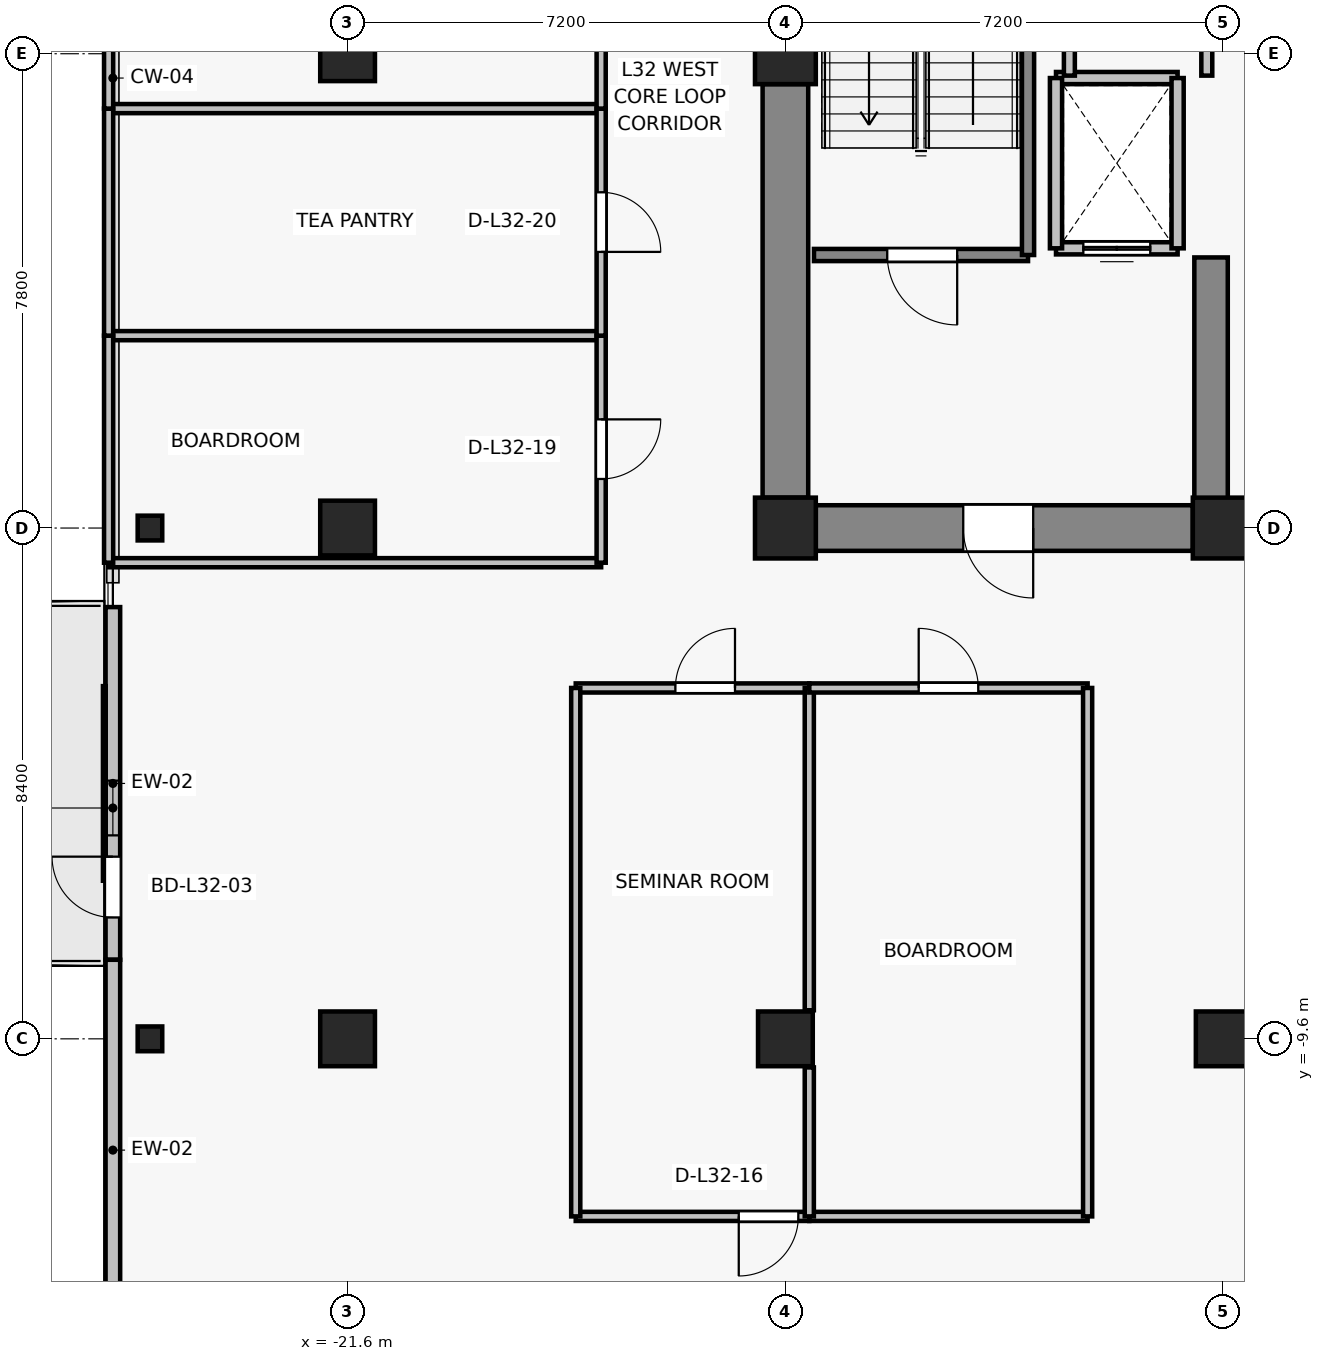
"""IFC4 building model, lengths in metres.
Left out: names, types, materials, properties, quantities, classifications, styles, units other than length and angle.
Written with IfcOpenShell. Run it as: python <this file> out.ifc"""

import sys

from ifc_helpers import new_model, si_unit, direction, frame, frame_2d, origin, origin_2d, place, context, subcontext, project, spatial, rectangle, i_section, extrude, source, transform, mapped, element, fill, save


model = new_model("IFC4")
c1 = context("Model", 3, precision=1e-05, world=origin(), true_north=direction((0.0, 1.0)))
c2 = subcontext(c1, "Body", "Model", "MODEL_VIEW")
j1 = project(units=[si_unit("LENGTHUNIT", "METRE"), si_unit("PLANEANGLEUNIT", "RADIAN")], contexts=[c1])
p1 = place(None, origin())
s1 = spatial("IfcSite", under=j1, at=p1, CompositionType="ELEMENT")
p2 = place(p1, origin())
s2 = spatial("IfcBuilding", under=s1, at=p2, CompositionType="ELEMENT")
p3 = place(p2, frame((0.0, 0.0, 116.5)))
s3 = spatial("IfcBuildingStorey", under=s2, at=p3, CompositionType="ELEMENT", Elevation=116.5)
for number, where, z_axis, x_axis in (
    (1, (-14.4, -1.2, 0.0), (0.0, 0.0, 1.0), (1.0, 0.0, 0.0)),
    (2, (-7.2, -1.2, 0.0), (0.0, 0.0, 1.0), (1.0, 0.0, 0.0)),
    (3, (-14.4, 6.6, 0.0), (0.0, 0.0, 1.0), (1.0, 0.0, 0.0)),
):
    element("IfcColumn", number, at=place(p3, frame(where, z_axis=z_axis, x_axis=x_axis)), inside=s3, PredefinedType="COLUMN", context=c2, shape_type="SweptSolid", body=[
        extrude(rectangle(XDim=1.0, YDim=1.0, at=origin_2d()), origin(), (0.0, 0.0, 1.0), 3.3),
    ])
for number, where, z_axis, x_axis in (
    (4, (-14.4, -9.6, 0.0), (0.0, 0.0, 1.0), (1.0, 0.0, 0.0)),
    (5, (-7.2, -9.6, 0.0), (0.0, 0.0, 1.0), (1.0, 0.0, 0.0)),
    (6, (-21.6, -9.6, 0.0), (0.0, 0.0, 1.0), (1.0, 0.0, 0.0)),
    (7, (-21.6, -1.2, 0.0), (0.0, 0.0, 1.0), (1.0, 0.0, 0.0)),
    (8, (-21.6, 6.6, 0.0), (0.0, 0.0, 1.0), (1.0, 0.0, 0.0)),
):
    element("IfcColumn", number, at=place(p3, frame(where, z_axis=z_axis, x_axis=x_axis)), inside=s3, PredefinedType="COLUMN", context=c2, shape_type="SweptSolid", body=[
        extrude(rectangle(XDim=0.9, YDim=0.9, at=origin_2d()), origin(), (0.0, 0.0, 1.0), 3.3),
    ])
for number, where, z_axis, x_axis in (
    (9, (-24.85, -9.6, 0.0), (0.0, 0.0, 1.0), (1.0, 0.0, 0.0)),
    (10, (-24.85, -1.2, 0.0), (0.0, 0.0, 1.0), (1.0, 0.0, 0.0)),
):
    element("IfcColumn", number, at=place(p3, frame(where, z_axis=z_axis, x_axis=x_axis)), inside=s3, PredefinedType="COLUMN", context=c2, shape_type="SweptSolid", body=[
        extrude(i_section(OverallWidth=0.404, OverallDepth=0.407, WebThickness=0.022, FlangeThickness=0.032, FilletRadius=0.015, at=origin_2d()), origin(), (0.0, 0.0, 1.0), 3.3),
    ])
p4 = place(p3, frame((-14.4, -0.7, 0.0), z_axis=(0.0, 0.0, 1.0), x_axis=(0.0, 1.0, 0.0)))
e11 = element("IfcWall", 11, at=p4, inside=s3, PredefinedType="SHEAR", context=c2, shape_type="SweptSolid", body=[
    extrude(rectangle(XDim=6.8, YDim=0.75, at=frame_2d((3.4, 0.0))), origin(), (0.0, 0.0, 1.0), 3.075),
])
p5 = place(p3, frame((-7.7, -1.2, 0.0), z_axis=(0.0, 0.0, 1.0), x_axis=(-1.0, 0.0, 0.0)))
e12 = element("IfcWall", 12, at=p5, inside=s3, PredefinedType="SHEAR", context=c2, shape_type="SweptSolid", body=[
    extrude(rectangle(XDim=6.2, YDim=0.75, at=frame_2d((3.1, 0.0))), origin(), (0.0, 0.0, 1.0), 3.075),
])
p6 = place(p5, frame((2.625, 0.0, 0.0)))
e13 = element("IfcOpeningElement", 13, at=p6, cuts=e12, PredefinedType="OPENING", context=c2, shape_type="SweptSolid", body=[
    extrude(rectangle(XDim=1.15, YDim=2.15, at=frame_2d((0.575, 1.075))), frame((0.0, 0.385, 0.0), z_axis=(0.0, -1.0, 0.0), x_axis=(1.0, 0.0, 0.0)), (0.0, 0.0, 1.0), 0.77),
])
p7 = place(p3, frame((-7.4, -0.825, 0.0), z_axis=(0.0, 0.0, 1.0), x_axis=(0.0, 1.0, 0.0)))
e14 = element("IfcWall", 14, at=p7, inside=s3, PredefinedType="SHEAR", context=c2, shape_type="SweptSolid", body=[
    extrude(rectangle(XDim=4.075, YDim=0.55, at=frame_2d((2.038, 0.0))), origin(), (0.0, 0.0, 1.0), 3.075),
])
p8 = place(p3, frame((-25.46, -8.3, 0.0), z_axis=(0.0, 0.0, 1.0), x_axis=(0.0, 1.0, 0.0)))
e15 = element("IfcWall", 15, at=p8, inside=s3, PredefinedType="SOLIDWALL", context=c2, shape_type="SweptSolid", body=[
    extrude(rectangle(XDim=5.8, YDim=0.24, at=frame_2d((2.9, 0.0))), origin(), (0.0, 0.0, 1.0), 3.075),
])
p9 = place(p8, frame((0.696, 0.0, 0.0)))
e16 = element("IfcOpeningElement", 16, at=p9, cuts=e15, PredefinedType="OPENING", context=c2, shape_type="SweptSolid", body=[
    extrude(rectangle(XDim=1.0, YDim=2.2, at=frame_2d((0.5, 1.1))), frame((0.0, 0.13, 0.0), z_axis=(0.0, -1.0, 0.0), x_axis=(1.0, 0.0, 0.0)), (0.0, 0.0, 1.0), 0.26),
])
p10 = place(p8, frame((2.046, 0.0, 0.85)))
e17 = element("IfcOpeningElement", 17, at=p10, cuts=e15, PredefinedType="OPENING", context=c2, shape_type="SweptSolid", body=[
    extrude(rectangle(XDim=0.9, YDim=1.35, at=frame_2d((0.45, 0.675))), frame((0.0, 0.13, 0.0), z_axis=(0.0, -1.0, 0.0), x_axis=(1.0, 0.0, 0.0)), (0.0, 0.0, 1.0), 0.26),
])
p11 = place(p3, frame((-25.46, -8.3, 0.0), z_axis=(0.0, 0.0, 1.0), x_axis=(0.0, -1.0, 0.0)))
e18 = element("IfcWall", 18, at=p11, inside=s3, PredefinedType="SOLIDWALL", context=c2, shape_type="SweptSolid", body=[
    extrude(rectangle(XDim=6.26, YDim=0.24, at=frame_2d((3.13, 0.0))), origin(), (0.0, 0.0, 1.0), 3.075),
])
p12 = place(p3, frame((-7.95, 3.4, 0.0), z_axis=(0.0, 0.0, 1.0), x_axis=(-1.0, 0.0, 0.0)))
e19 = element("IfcWall", 19, at=p12, inside=s3, PredefinedType="SOLIDWALL", context=c2, shape_type="SweptSolid", body=[
    extrude(rectangle(XDim=2.0, YDim=0.2, at=frame_2d((1.0, 0.0))), origin(), (0.0, 0.0, 1.0), 3.075),
])
p13 = place(p12, frame((0.45, 0.0, 0.0)))
e20 = element("IfcOpeningElement", 20, at=p13, cuts=e19, PredefinedType="OPENING", context=c2, shape_type="SweptSolid", body=[
    extrude(rectangle(XDim=1.1, YDim=2.2, at=frame_2d((0.55, 1.1))), frame((0.0, 0.11, 0.0), z_axis=(0.0, -1.0, 0.0), x_axis=(1.0, 0.0, 0.0)), (0.0, 0.0, 1.0), 0.22),
])
p14 = place(p3, frame((-9.95, 6.2, 0.0), z_axis=(0.0, 0.0, 1.0), x_axis=(1.0, 0.0, 0.0)))
e21 = element("IfcWall", 21, at=p14, inside=s3, PredefinedType="SOLIDWALL", context=c2, shape_type="SweptSolid", body=[
    extrude(rectangle(XDim=2.0, YDim=0.2, at=frame_2d((1.0, 0.0))), origin(), (0.0, 0.0, 1.0), 3.075),
])
for number, where, z_axis, x_axis in (
    (22, (-9.95, 3.4, 0.0), (0.0, 0.0, 1.0), (0.0, 1.0, 0.0)),
    (23, (-7.95, 6.2, 0.0), (0.0, 0.0, 1.0), (0.0, -1.0, 0.0)),
):
    element("IfcWall", number, at=place(p3, frame(where, z_axis=z_axis, x_axis=x_axis)), inside=s3, PredefinedType="SOLIDWALL", context=c2, shape_type="SweptSolid", body=[
        extrude(rectangle(XDim=2.8, YDim=0.2, at=frame_2d((1.4, 0.0))), origin(), (0.0, 0.0, 1.0), 3.075),
    ])
p15 = place(p3, frame((-10.41, 3.29, 0.0), z_axis=(0.0, 0.0, 1.0), x_axis=(-1.0, 0.0, 0.0)))
e24 = element("IfcWall", 24, at=p15, inside=s3, PredefinedType="SOLIDWALL", context=c2, shape_type="SweptSolid", body=[
    extrude(rectangle(XDim=3.52, YDim=0.2, at=frame_2d((1.76, 0.0))), origin(), (0.0, 0.0, 1.0), 3.075),
])
p16 = place(p15, frame((1.165, 0.0, 0.0)))
e25 = element("IfcOpeningElement", 25, at=p16, cuts=e24, PredefinedType="OPENING", context=c2, shape_type="SweptSolid", body=[
    extrude(rectangle(XDim=1.15, YDim=2.15, at=frame_2d((0.575, 1.075))), frame((0.0, 0.11, 0.0), z_axis=(0.0, -1.0, 0.0), x_axis=(1.0, 0.0, 0.0)), (0.0, 0.0, 1.0), 0.22),
])
p17 = place(p3, frame((-10.41, 12.13, 0.0), z_axis=(0.0, 0.0, 1.0), x_axis=(0.0, -1.0, 0.0)))
e26 = element("IfcWall", 26, at=p17, inside=s3, PredefinedType="SOLIDWALL", context=c2, shape_type="SweptSolid", body=[
    extrude(rectangle(XDim=8.84, YDim=0.2, at=frame_2d((4.42, 0.0))), origin(), (0.0, 0.0, 1.0), 3.075),
])
p18 = place(p3, frame((-9.73, 6.24, 0.0), z_axis=(0.0, 0.0, 1.0), x_axis=(0.0, 1.0, 0.0)))
e27 = element("IfcWall", 27, at=p18, inside=s3, PredefinedType="PARTITIONING", context=c2, shape_type="SweptSolid", body=[
    extrude(rectangle(XDim=1.09, YDim=0.18, at=frame_2d((0.545, 0.0))), origin(), (0.0, 0.0, 1.0), 3.075),
])
p19 = place(p3, frame((-7.47, 7.33, 0.0), z_axis=(0.0, 0.0, 1.0), x_axis=(0.0, -1.0, 0.0)))
e28 = element("IfcWall", 28, at=p19, inside=s3, PredefinedType="PARTITIONING", context=c2, shape_type="SweptSolid", body=[
    extrude(rectangle(XDim=1.09, YDim=0.18, at=frame_2d((0.545, 0.0))), origin(), (0.0, 0.0, 1.0), 2.515),
])
p20 = place(p3, frame((-14.007, -12.52, 0.0), z_axis=(0.0, 0.0, 1.0), x_axis=(-1.0, 0.0, 0.0)))
e29 = element("IfcWall", 29, at=p20, inside=s3, PredefinedType="PARTITIONING", context=c2, shape_type="SweptSolid", body=[
    extrude(rectangle(XDim=3.841, YDim=0.15, at=frame_2d((1.92, 0.0))), origin(), (0.0, 0.0, 1.0), 2.515),
])
p21 = place(p20, frame((0.18, 0.0, 0.0)))
e30 = element("IfcOpeningElement", 30, at=p21, cuts=e29, PredefinedType="OPENING", context=c2, shape_type="SweptSolid", body=[
    extrude(rectangle(XDim=0.98, YDim=2.15, at=frame_2d((0.49, 1.075))), frame((0.0, 0.085, 0.0), z_axis=(0.0, -1.0, 0.0), x_axis=(1.0, 0.0, 0.0)), (0.0, 0.0, 1.0), 0.17),
])
p22 = place(p3, frame((-17.848, -3.83, 0.0), z_axis=(0.0, 0.0, 1.0), x_axis=(1.0, 0.0, 0.0)))
e31 = element("IfcWall", 31, at=p22, inside=s3, PredefinedType="PARTITIONING", context=c2, shape_type="SweptSolid", body=[
    extrude(rectangle(XDim=3.841, YDim=0.15, at=frame_2d((1.92, 0.0))), origin(), (0.0, 0.0, 1.0), 2.515),
])
p23 = place(p22, frame((1.639, 0.0, 0.0)))
e32 = element("IfcOpeningElement", 32, at=p23, cuts=e31, PredefinedType="OPENING", context=c2, shape_type="SweptSolid", body=[
    extrude(rectangle(XDim=0.98, YDim=2.15, at=frame_2d((0.49, 1.075))), frame((0.0, 0.085, 0.0), z_axis=(0.0, -1.0, 0.0), x_axis=(1.0, 0.0, 0.0)), (0.0, 0.0, 1.0), 0.17),
])
p24 = place(p3, frame((-17.848, -12.52, 0.0), z_axis=(0.0, 0.0, 1.0), x_axis=(0.0, 1.0, 0.0)))
e33 = element("IfcWall", 33, at=p24, inside=s3, PredefinedType="PARTITIONING", context=c2, shape_type="SweptSolid", body=[
    extrude(rectangle(XDim=8.69, YDim=0.15, at=frame_2d((4.345, 0.0))), origin(), (0.0, 0.0, 1.0), 2.515),
])
p25 = place(p3, frame((-14.007, -3.83, 0.0), z_axis=(0.0, 0.0, 1.0), x_axis=(0.0, -1.0, 0.0)))
e34 = element("IfcWall", 34, at=p25, inside=s3, PredefinedType="PARTITIONING", context=c2, shape_type="SweptSolid", body=[
    extrude(rectangle(XDim=5.3, YDim=0.15, at=frame_2d((2.65, 0.0))), origin(), (0.0, 0.0, 1.0), 2.615),
])
p26 = place(p3, frame((-9.43, -12.52, 0.0), z_axis=(0.0, 0.0, 1.0), x_axis=(-1.0, 0.0, 0.0)))
e35 = element("IfcWall", 35, at=p26, inside=s3, PredefinedType="PARTITIONING", context=c2, shape_type="SweptSolid", body=[
    extrude(rectangle(XDim=4.577, YDim=0.15, at=frame_2d((2.289, 0.0))), origin(), (0.0, 0.0, 1.0), 2.665),
])
p27 = place(p3, frame((-14.007, -3.83, 0.0), z_axis=(0.0, 0.0, 1.0), x_axis=(1.0, 0.0, 0.0)))
e36 = element("IfcWall", 36, at=p27, inside=s3, PredefinedType="PARTITIONING", context=c2, shape_type="SweptSolid", body=[
    extrude(rectangle(XDim=4.577, YDim=0.15, at=frame_2d((2.289, 0.0))), origin(), (0.0, 0.0, 1.0), 3.075),
])
p28 = place(p27, frame((1.799, 0.0, 0.0)))
e37 = element("IfcOpeningElement", 37, at=p28, cuts=e36, PredefinedType="OPENING", context=c2, shape_type="SweptSolid", body=[
    extrude(rectangle(XDim=0.98, YDim=2.15, at=frame_2d((0.49, 1.075))), frame((0.0, 0.085, 0.0), z_axis=(0.0, -1.0, 0.0), x_axis=(1.0, 0.0, 0.0)), (0.0, 0.0, 1.0), 0.17),
])
p29 = place(p3, frame((-14.007, -12.52, 0.0), z_axis=(0.0, 0.0, 1.0), x_axis=(0.0, 1.0, 0.0)))
e38 = element("IfcWall", 38, at=p29, inside=s3, PredefinedType="PARTITIONING", context=c2, shape_type="SweptSolid", body=[
    extrude(rectangle(XDim=2.45, YDim=0.15, at=frame_2d((1.225, 0.0))), origin(), (0.0, 0.0, 1.0), 3.075),
])
p30 = place(p3, frame((-9.43, -3.83, 0.0), z_axis=(0.0, 0.0, 1.0), x_axis=(0.0, -1.0, 0.0)))
e39 = element("IfcWall", 39, at=p30, inside=s3, PredefinedType="PARTITIONING", context=c2, shape_type="SweptSolid", body=[
    extrude(rectangle(XDim=8.69, YDim=0.15, at=frame_2d((4.345, 0.0))), origin(), (0.0, 0.0, 1.0), 2.515),
])
for number, where, z_axis, x_axis in (
    (40, (-17.43, -1.77, 0.0), (0.0, 0.0, 1.0), (-1.0, 0.0, 0.0)),
    (41, (-25.53, 1.964, 0.0), (0.0, 0.0, 1.0), (1.0, 0.0, 0.0)),
):
    element("IfcWall", number, at=place(p3, frame(where, z_axis=z_axis, x_axis=x_axis)), inside=s3, PredefinedType="PARTITIONING", context=c2, shape_type="SweptSolid", body=[
        extrude(rectangle(XDim=8.1, YDim=0.15, at=frame_2d((4.05, 0.0))), origin(), (0.0, 0.0, 1.0), 2.515),
    ])
p31 = place(p3, frame((-25.53, -1.77, 0.0), z_axis=(0.0, 0.0, 1.0), x_axis=(0.0, 1.0, 0.0)))
e42 = element("IfcWall", 42, at=p31, inside=s3, PredefinedType="PARTITIONING", context=c2, shape_type="SweptSolid", body=[
    extrude(rectangle(XDim=3.734, YDim=0.15, at=frame_2d((1.867, 0.0))), origin(), (0.0, 0.0, 1.0), 3.075),
])
p32 = place(p3, frame((-17.43, 1.964, 0.0), z_axis=(0.0, 0.0, 1.0), x_axis=(0.0, -1.0, 0.0)))
e43 = element("IfcWall", 43, at=p32, inside=s3, PredefinedType="PARTITIONING", context=c2, shape_type="SweptSolid", body=[
    extrude(rectangle(XDim=3.734, YDim=0.15, at=frame_2d((1.867, 0.0))), origin(), (0.0, 0.0, 1.0), 2.515),
])
p33 = place(p32, frame((1.377, 0.0, 0.0)))
e44 = element("IfcOpeningElement", 44, at=p33, cuts=e43, PredefinedType="OPENING", context=c2, shape_type="SweptSolid", body=[
    extrude(rectangle(XDim=0.98, YDim=2.15, at=frame_2d((0.49, 1.075))), frame((0.0, 0.085, 0.0), z_axis=(0.0, -1.0, 0.0), x_axis=(1.0, 0.0, 0.0)), (0.0, 0.0, 1.0), 0.17),
])
p34 = place(p3, frame((-25.53, 5.698, 0.0), z_axis=(0.0, 0.0, 1.0), x_axis=(1.0, 0.0, 0.0)))
e45 = element("IfcWall", 45, at=p34, inside=s3, PredefinedType="PARTITIONING", context=c2, shape_type="SweptSolid", body=[
    extrude(rectangle(XDim=8.1, YDim=0.15, at=frame_2d((4.05, 0.0))), origin(), (0.0, 0.0, 1.0), 2.515),
])
p35 = place(p3, frame((-25.53, 1.964, 0.0), z_axis=(0.0, 0.0, 1.0), x_axis=(0.0, 1.0, 0.0)))
e46 = element("IfcWall", 46, at=p35, inside=s3, PredefinedType="PARTITIONING", context=c2, shape_type="SweptSolid", body=[
    extrude(rectangle(XDim=3.734, YDim=0.15, at=frame_2d((1.867, 0.0))), origin(), (0.0, 0.0, 1.0), 3.075),
])
p36 = place(p3, frame((-17.43, 5.698, 0.0), z_axis=(0.0, 0.0, 1.0), x_axis=(0.0, -1.0, 0.0)))
e47 = element("IfcWall", 47, at=p36, inside=s3, PredefinedType="PARTITIONING", context=c2, shape_type="SweptSolid", body=[
    extrude(rectangle(XDim=3.734, YDim=0.15, at=frame_2d((1.867, 0.0))), origin(), (0.0, 0.0, 1.0), 3.075),
])
p37 = place(p36, frame((1.377, 0.0, 0.0)))
e48 = element("IfcOpeningElement", 48, at=p37, cuts=e47, PredefinedType="OPENING", context=c2, shape_type="SweptSolid", body=[
    extrude(rectangle(XDim=0.98, YDim=2.15, at=frame_2d((0.49, 1.075))), frame((0.0, 0.085, 0.0), z_axis=(0.0, -1.0, 0.0), x_axis=(1.0, 0.0, 0.0)), (0.0, 0.0, 1.0), 0.17),
])
p38 = place(p3, frame((-25.53, 5.698, 0.0), z_axis=(0.0, 0.0, 1.0), x_axis=(0.0, 1.0, 0.0)))
e49 = element("IfcWall", 49, at=p38, inside=s3, PredefinedType="PARTITIONING", context=c2, shape_type="SweptSolid", body=[
    extrude(rectangle(XDim=4.449, YDim=0.15, at=frame_2d((2.224, 0.0))), origin(), (0.0, 0.0, 1.0), 3.075),
])
p39 = place(p3, frame((-17.43, 10.146, 0.0), z_axis=(0.0, 0.0, 1.0), x_axis=(0.0, -1.0, 0.0)))
e50 = element("IfcWall", 50, at=p39, inside=s3, PredefinedType="PARTITIONING", context=c2, shape_type="SweptSolid", body=[
    extrude(rectangle(XDim=4.449, YDim=0.15, at=frame_2d((2.224, 0.0))), origin(), (0.0, 0.0, 1.0), 2.515),
])
p40 = place(p39, frame((1.734, 0.0, 0.0)))
e51 = element("IfcOpeningElement", 51, at=p40, cuts=e50, PredefinedType="OPENING", context=c2, shape_type="SweptSolid", body=[
    extrude(rectangle(XDim=0.98, YDim=2.15, at=frame_2d((0.49, 1.075))), frame((0.0, 0.085, 0.0), z_axis=(0.0, -1.0, 0.0), x_axis=(1.0, 0.0, 0.0)), (0.0, 0.0, 1.0), 0.17),
])
m1 = source(origin(), c2, "Body", "SweptSolid", [
    extrude(rectangle(XDim=1.0, YDim=2.2, at=frame_2d((0.5, 1.1))), frame((0.0, 0.025, 0.0), z_axis=(0.0, -1.0, 0.0), x_axis=(1.0, 0.0, 0.0)), (0.0, 0.0, 1.0), 0.05),
])
p41 = place(p9, origin())
e52 = element("IfcDoor", 52, at=p41, inside=s3, OperationType="SINGLE_SWING_RIGHT", PredefinedType="DOOR", context=c2, shape_type="MappedRepresentation", body=[
    mapped(m1, transform((0.0, 0.0, 0.0), x_axis=(1.0, 0.0, 0.0), y_axis=(0.0, 1.0, 0.0), z_axis=(0.0, 0.0, 1.0), scale=1.0)),
])
fill(e16, e52)
m2 = source(origin(), c2, "Body", "SweptSolid", [
    extrude(rectangle(XDim=0.9, YDim=1.35, at=frame_2d((0.45, 0.675))), frame((0.0, 0.03, 0.0), z_axis=(0.0, -1.0, 0.0), x_axis=(1.0, 0.0, 0.0)), (0.0, 0.0, 1.0), 0.06),
])
p42 = place(p10, origin())
e53 = element("IfcWindow", 53, at=p42, inside=s3, PartitioningType="SINGLE_PANEL", PredefinedType="WINDOW", context=c2, shape_type="MappedRepresentation", body=[
    mapped(m2, transform((0.0, 0.0, 0.0), x_axis=(1.0, 0.0, 0.0), y_axis=(0.0, 1.0, 0.0), z_axis=(0.0, 0.0, 1.0), scale=1.0)),
])
fill(e17, e53)
m3 = source(origin(), c2, "Body", "SweptSolid", [
    extrude(rectangle(XDim=1.1, YDim=2.2, at=frame_2d((0.55, 1.1))), frame((0.0, 0.025, 0.0), z_axis=(0.0, -1.0, 0.0), x_axis=(1.0, 0.0, 0.0)), (0.0, 0.0, 1.0), 0.05),
])
p43 = place(p13, origin())
e54 = element("IfcDoor", 54, at=p43, inside=s3, OperationType="DOUBLE_DOOR_SLIDING", PredefinedType="DOOR", context=c2, shape_type="MappedRepresentation", body=[
    mapped(m3, transform((0.0, 0.0, 0.0), x_axis=(1.0, 0.0, 0.0), y_axis=(0.0, 1.0, 0.0), z_axis=(0.0, 0.0, 1.0), scale=1.0)),
])
fill(e20, e54)
m4 = source(origin(), c2, "Body", "SweptSolid", [
    extrude(rectangle(XDim=1.15, YDim=2.15, at=frame_2d((0.575, 1.075))), frame((0.0, 0.025, 0.0), z_axis=(0.0, -1.0, 0.0), x_axis=(1.0, 0.0, 0.0)), (0.0, 0.0, 1.0), 0.05),
])
p44 = place(p16, origin())
e55 = element("IfcDoor", 55, at=p44, inside=s3, OperationType="SINGLE_SWING_LEFT", PredefinedType="DOOR", context=c2, shape_type="MappedRepresentation", body=[
    mapped(m4, transform((0.0, 0.0, 0.0), x_axis=(1.0, 0.0, 0.0), y_axis=(0.0, 1.0, 0.0), z_axis=(0.0, 0.0, 1.0), scale=1.0)),
])
fill(e25, e55)
p45 = place(p6, origin())
e56 = element("IfcDoor", 56, at=p45, inside=s3, OperationType="SINGLE_SWING_LEFT", PredefinedType="DOOR", context=c2, shape_type="MappedRepresentation", body=[
    mapped(m4, transform((0.0, 0.0, 0.0), x_axis=(1.0, 0.0, 0.0), y_axis=(0.0, 1.0, 0.0), z_axis=(0.0, 0.0, 1.0), scale=1.0)),
])
fill(e13, e56)
m5 = source(origin(), c2, "Body", "SweptSolid", [
    extrude(rectangle(XDim=0.98, YDim=2.15, at=frame_2d((0.49, 1.075))), frame((0.0, 0.025, 0.0), z_axis=(0.0, -1.0, 0.0), x_axis=(1.0, 0.0, 0.0)), (0.0, 0.0, 1.0), 0.05),
])
p46 = place(p23, origin())
e57 = element("IfcDoor", 57, at=p46, inside=s3, OperationType="SINGLE_SWING_RIGHT", PredefinedType="DOOR", context=c2, shape_type="MappedRepresentation", body=[
    mapped(m5, transform((0.0, 0.0, 0.0), x_axis=(1.0, 0.0, 0.0), y_axis=(0.0, 1.0, 0.0), z_axis=(0.0, 0.0, 1.0), scale=1.0)),
])
fill(e32, e57)
p47 = place(p28, origin())
e58 = element("IfcDoor", 58, at=p47, inside=s3, OperationType="SINGLE_SWING_LEFT", PredefinedType="DOOR", context=c2, shape_type="MappedRepresentation", body=[
    mapped(m5, transform((0.0, 0.0, 0.0), x_axis=(1.0, 0.0, 0.0), y_axis=(0.0, 1.0, 0.0), z_axis=(0.0, 0.0, 1.0), scale=1.0)),
])
fill(e37, e58)
p48 = place(p21, origin())
e59 = element("IfcDoor", 59, at=p48, inside=s3, OperationType="SINGLE_SWING_RIGHT", PredefinedType="DOOR", context=c2, shape_type="MappedRepresentation", body=[
    mapped(m5, transform((0.0, 0.0, 0.0), x_axis=(1.0, 0.0, 0.0), y_axis=(0.0, 1.0, 0.0), z_axis=(0.0, 0.0, 1.0), scale=1.0)),
])
fill(e30, e59)
p49 = place(p33, origin())
e60 = element("IfcDoor", 60, at=p49, inside=s3, OperationType="SINGLE_SWING_LEFT", PredefinedType="DOOR", context=c2, shape_type="MappedRepresentation", body=[
    mapped(m5, transform((0.0, 0.0, 0.0), x_axis=(1.0, 0.0, 0.0), y_axis=(0.0, 1.0, 0.0), z_axis=(0.0, 0.0, 1.0), scale=1.0)),
])
fill(e44, e60)
p50 = place(p37, origin())
e61 = element("IfcDoor", 61, at=p50, inside=s3, OperationType="SINGLE_SWING_RIGHT", PredefinedType="DOOR", context=c2, shape_type="MappedRepresentation", body=[
    mapped(m5, transform((0.0, 0.0, 0.0), x_axis=(1.0, 0.0, 0.0), y_axis=(0.0, 1.0, 0.0), z_axis=(0.0, 0.0, 1.0), scale=1.0)),
])
fill(e48, e61)
save(model, sys.argv[1])
